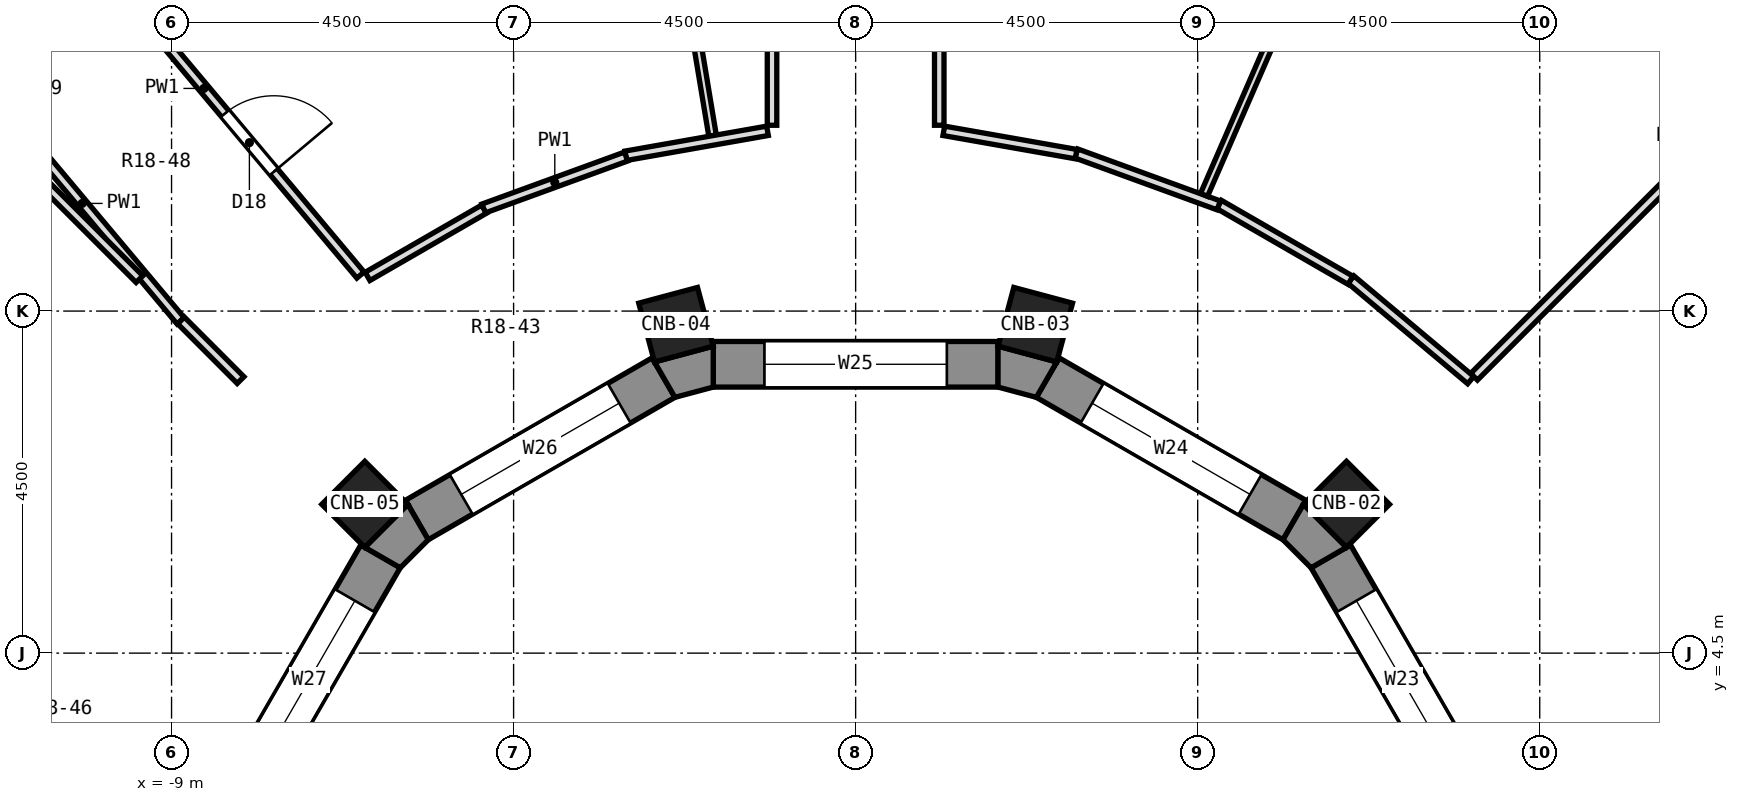
"""IFC4 building model, lengths in metres.
Left out: names, types, materials, properties, quantities, classifications, styles, units other than length and angle.
Written with IfcOpenShell. Run it as: python <this file> out.ifc"""

import sys

from ifc_helpers import new_model, si_unit, direction, frame, frame_2d, origin, origin_2d, place, context, subcontext, project, spatial, polyline, rectangle, outline, extrude, element, fill, save


model = new_model("IFC4")
c1 = context("Model", 3, precision=1e-05, world=origin(), true_north=direction((0.0, 1.0)))
c2 = subcontext(c1, "Body", "Model", "MODEL_VIEW")
j1 = project(units=[si_unit("LENGTHUNIT", "METRE"), si_unit("PLANEANGLEUNIT", "RADIAN")], contexts=[c1])
p1 = place(None, origin())
s1 = spatial("IfcSite", under=j1, at=p1, CompositionType="ELEMENT")
p2 = place(p1, origin())
s2 = spatial("IfcBuilding", under=s1, at=p2, CompositionType="ELEMENT")
p3 = place(p2, frame((0.0, 0.0, 101.8)))
s3 = spatial("IfcBuildingStorey", under=s2, at=p3, CompositionType="ELEMENT", Elevation=101.8)
for number, where, z_axis, x_axis in (
    (1, (6.458, 6.458, 0.0), (0.0, 0.0, 1.0), (0.707, 0.707, 0.0)),
    (2, (2.364, 8.821, 0.0), (0.0, 0.0, 1.0), (0.259, 0.966, 0.0)),
    (3, (-2.364, 8.821, 0.0), (0.0, 0.0, 1.0), (-0.259, 0.966, 0.0)),
    (4, (-6.458, 6.458, 0.0), (0.0, 0.0, 1.0), (-0.707, 0.707, 0.0)),
):
    element("IfcColumn", number, at=place(p3, frame(where, z_axis=z_axis, x_axis=x_axis)), inside=s3, PredefinedType="COLUMN", context=c2, shape_type="SweptSolid", body=[
        extrude(rectangle(XDim=0.8, YDim=0.8, at=origin_2d()), origin(), (0.0, 0.0, 1.0), 3.3),
    ])
p4 = place(p3, frame((8.125, 2.527, 0.0), z_axis=(0.0, 0.0, 1.0), x_axis=(-0.499964958637, 0.86604563398, 0.0)))
e5 = element("IfcWall", 5, at=p4, inside=s3, PredefinedType="SOLIDWALL", context=c2, shape_type="SweptSolid", body=[
    extrude(rectangle(XDim=3.747, YDim=0.6, at=frame_2d((1.874, 0.0))), origin(), (0.0, 0.0, 1.0), 2.8),
])
p5 = place(p4, frame((0.674, 0.0, 0.9)))
e6 = element("IfcOpeningElement", 6, at=p5, cuts=e5, PredefinedType="OPENING", context=c2, shape_type="SweptSolid", body=[
    extrude(rectangle(XDim=2.4, YDim=1.8, at=frame_2d((1.2, 0.9))), frame((0.0, 0.312, 0.0), z_axis=(0.0, -1.0, 0.0), x_axis=(1.0, 0.0, 0.0)), (0.0, 0.0, 1.0), 0.624),
])
p6 = place(p3, frame((5.773, 6.251, 0.0), z_axis=(0.0, 0.0, 1.0), x_axis=(-0.86604563398, 0.499964958637, 0.0)))
e7 = element("IfcWall", 7, at=p6, inside=s3, PredefinedType="SOLIDWALL", context=c2, shape_type="SweptSolid", body=[
    extrude(rectangle(XDim=3.747, YDim=0.6, at=frame_2d((1.874, 0.0))), origin(), (0.0, 0.0, 1.0), 2.8),
])
p7 = place(p6, frame((0.674, 0.0, 0.9)))
e8 = element("IfcOpeningElement", 8, at=p7, cuts=e7, PredefinedType="OPENING", context=c2, shape_type="SweptSolid", body=[
    extrude(rectangle(XDim=2.4, YDim=1.8, at=frame_2d((1.2, 0.9))), frame((0.0, 0.312, 0.0), z_axis=(0.0, -1.0, 0.0), x_axis=(1.0, 0.0, 0.0)), (0.0, 0.0, 1.0), 0.624),
])
p8 = place(p3, frame((1.874, 8.3, 0.0), z_axis=(0.0, 0.0, 1.0), x_axis=(-1.0, 0.0, 0.0)))
e9 = element("IfcWall", 9, at=p8, inside=s3, PredefinedType="SOLIDWALL", context=c2, shape_type="SweptSolid", body=[
    extrude(rectangle(XDim=3.748, YDim=0.6, at=frame_2d((1.874, 0.0))), origin(), (0.0, 0.0, 1.0), 2.8),
])
p9 = place(p8, frame((0.674, 0.0, 0.9)))
e10 = element("IfcOpeningElement", 10, at=p9, cuts=e9, PredefinedType="OPENING", context=c2, shape_type="SweptSolid", body=[
    extrude(rectangle(XDim=2.4, YDim=1.8, at=frame_2d((1.2, 0.9))), frame((0.0, 0.312, 0.0), z_axis=(0.0, -1.0, 0.0), x_axis=(1.0, 0.0, 0.0)), (0.0, 0.0, 1.0), 0.624),
])
p10 = place(p3, frame((-2.527, 8.125, 0.0), z_axis=(0.0, 0.0, 1.0), x_axis=(-0.86604563398, -0.499964958637, 0.0)))
e11 = element("IfcWall", 11, at=p10, inside=s3, PredefinedType="SOLIDWALL", context=c2, shape_type="SweptSolid", body=[
    extrude(rectangle(XDim=3.747, YDim=0.6, at=frame_2d((1.874, 0.0))), origin(), (0.0, 0.0, 1.0), 2.8),
])
p11 = place(p10, frame((0.674, 0.0, 0.9)))
e12 = element("IfcOpeningElement", 12, at=p11, cuts=e11, PredefinedType="OPENING", context=c2, shape_type="SweptSolid", body=[
    extrude(rectangle(XDim=2.4, YDim=1.8, at=frame_2d((1.2, 0.9))), frame((0.0, 0.312, 0.0), z_axis=(0.0, -1.0, 0.0), x_axis=(1.0, 0.0, 0.0)), (0.0, 0.0, 1.0), 0.624),
])
p12 = place(p3, frame((-6.251, 5.773, 0.0), z_axis=(0.0, 0.0, 1.0), x_axis=(-0.499964958637, -0.86604563398, 0.0)))
e13 = element("IfcWall", 13, at=p12, inside=s3, PredefinedType="SOLIDWALL", context=c2, shape_type="SweptSolid", body=[
    extrude(rectangle(XDim=3.747, YDim=0.6, at=frame_2d((1.874, 0.0))), origin(), (0.0, 0.0, 1.0), 2.8),
])
p13 = place(p12, frame((0.674, 0.0, 0.9)))
e14 = element("IfcOpeningElement", 14, at=p13, cuts=e13, PredefinedType="OPENING", context=c2, shape_type="SweptSolid", body=[
    extrude(rectangle(XDim=2.4, YDim=1.8, at=frame_2d((1.2, 0.9))), frame((0.0, 0.312, 0.0), z_axis=(0.0, -1.0, 0.0), x_axis=(1.0, 0.0, 0.0)), (0.0, 0.0, 1.0), 0.624),
])
p14 = place(p3, origin())
e15 = element("IfcWall", 15, at=p14, inside=s3, PredefinedType="SOLIDWALL", context=c2, shape_type="SweptSolid", body=[
    extrude(outline(polyline([(5.892, 6.458), (5.623, 5.991), (5.991, 5.623), (6.458, 5.892), (5.892, 6.458)])), origin(), (0.0, 0.0, 1.0), 2.8),
])
p15 = place(p3, origin())
e16 = element("IfcWall", 16, at=p15, inside=s3, PredefinedType="SOLIDWALL", context=c2, shape_type="SweptSolid", body=[
    extrude(outline(polyline([(1.874, 8.538), (1.874, 8.0), (2.377, 7.865), (2.646, 8.331), (1.874, 8.538)])), origin(), (0.0, 0.0, 1.0), 2.8),
])
p16 = place(p3, origin())
e17 = element("IfcWall", 17, at=p16, inside=s3, PredefinedType="SOLIDWALL", context=c2, shape_type="SweptSolid", body=[
    extrude(outline(polyline([(-2.646, 8.331), (-2.377, 7.865), (-1.874, 8.0), (-1.874, 8.538), (-2.646, 8.331)])), origin(), (0.0, 0.0, 1.0), 2.8),
])
p17 = place(p3, origin())
e18 = element("IfcWall", 18, at=p17, inside=s3, PredefinedType="SOLIDWALL", context=c2, shape_type="SweptSolid", body=[
    extrude(outline(polyline([(-6.458, 5.892), (-5.991, 5.623), (-5.623, 5.991), (-5.892, 6.458), (-6.458, 5.892)])), origin(), (0.0, 0.0, 1.0), 2.8),
])
p18 = place(p3, frame((-2.655, 15.951, 0.0), z_axis=(0.0, 0.0, 1.0), x_axis=(0.164012054584, -0.986458334625, 0.0)))
e19 = element("IfcWall", 19, at=p18, inside=s3, PredefinedType="PARTITIONING", context=c2, shape_type="SweptSolid", body=[
    extrude(rectangle(XDim=4.707, YDim=0.1, at=frame_2d((2.354, 0.0))), origin(), (0.0, 0.0, 1.0), 2.8),
])
p19 = place(p18, frame((0.61, 0.0, 0.0)))
e20 = element("IfcOpeningElement", 20, at=p19, cuts=e19, PredefinedType="OPENING", context=c2, shape_type="SweptSolid", body=[
    extrude(rectangle(XDim=0.9, YDim=2.1, at=frame_2d((0.45, 1.05))), frame((0.0, 0.062, 0.0), z_axis=(0.0, -1.0, 0.0), x_axis=(1.0, 0.0, 0.0)), (0.0, 0.0, 1.0), 0.124),
])
p20 = place(p3, frame((-11.472, 11.962, 0.0), z_axis=(0.0, 0.0, 1.0), x_axis=(0.642533165624, -0.766257875048, 0.0)))
e21 = element("IfcWall", 21, at=p20, inside=s3, PredefinedType="PARTITIONING", context=c2, shape_type="SweptSolid", body=[
    extrude(rectangle(XDim=4.033, YDim=0.125, at=frame_2d((2.017, 0.0))), origin(), (0.0, 0.0, 1.0), 2.8),
])
p21 = place(p3, frame((-9.828, 13.423, 0.0), z_axis=(0.0, 0.0, 1.0), x_axis=(0.642779949684, -0.766050870559, 0.0)))
e22 = element("IfcWall", 22, at=p21, inside=s3, PredefinedType="PARTITIONING", context=c2, shape_type="SweptSolid", body=[
    extrude(rectangle(XDim=5.155, YDim=0.125, at=frame_2d((2.578, 0.0))), origin(), (0.0, 0.0, 1.0), 2.8),
])
p22 = place(p21, frame((2.381, 0.0, 0.0)))
e23 = element("IfcOpeningElement", 23, at=p22, cuts=e22, PredefinedType="OPENING", context=c2, shape_type="SweptSolid", body=[
    extrude(rectangle(XDim=1.0, YDim=2.1, at=frame_2d((0.5, 1.05))), frame((0.0, 0.074, 0.0), z_axis=(0.0, -1.0, 0.0), x_axis=(1.0, 0.0, 0.0)), (0.0, 0.0, 1.0), 0.149),
])
p23 = place(p3, frame((-8.875, 8.876, 0.0), z_axis=(0.0, 0.0, 1.0), x_axis=(0.706666079052, -0.707547208826, 0.0)))
e24 = element("IfcWall", 24, at=p23, inside=s3, PredefinedType="PARTITIONING", context=c2, shape_type="SweptSolid", body=[
    extrude(rectangle(XDim=1.108, YDim=0.125, at=frame_2d((0.554, 0.0))), origin(), (0.0, 0.0, 1.0), 2.8),
])
p24 = place(p3, frame((-13.101, 13.099, 0.0), z_axis=(0.0, 0.0, 1.0), x_axis=(0.707106781187, -0.707106781187, 0.0)))
e25 = element("IfcWall", 25, at=p24, inside=s3, PredefinedType="PARTITIONING", context=c2, shape_type="SweptSolid", body=[
    extrude(rectangle(XDim=5.203, YDim=0.125, at=frame_2d((2.602, 0.0))), origin(), (0.0, 0.0, 1.0), 2.8),
])
p25 = place(p3, frame((6.515, 9.415, 0.0), z_axis=(0.0, 0.0, 1.0), x_axis=(0.766097328455, -0.642724578131, 0.0)))
e26 = element("IfcWall", 26, at=p25, inside=s3, PredefinedType="PARTITIONING", context=c2, shape_type="SweptSolid", body=[
    extrude(rectangle(XDim=2.058, YDim=0.125, at=frame_2d((1.029, 0.0))), origin(), (0.0, 0.0, 1.0), 2.8),
])
p26 = place(p3, frame((4.781, 10.403, 0.0), z_axis=(0.0, 0.0, 1.0), x_axis=(0.866173368732, -0.499743629573, 0.0)))
e27 = element("IfcWall", 27, at=p26, inside=s3, PredefinedType="PARTITIONING", context=c2, shape_type="SweptSolid", body=[
    extrude(rectangle(XDim=1.996, YDim=0.125, at=frame_2d((0.998, 0.0))), origin(), (0.0, 0.0, 1.0), 2.8),
])
p27 = place(p3, frame((2.902, 11.073, 0.0), z_axis=(0.0, 0.0, 1.0), x_axis=(0.939557391744, -0.342391453777, 0.0)))
e28 = element("IfcWall", 28, at=p27, inside=s3, PredefinedType="PARTITIONING", context=c2, shape_type="SweptSolid", body=[
    extrude(rectangle(XDim=1.995, YDim=0.125, at=frame_2d((0.998, 0.0))), origin(), (0.0, 0.0, 1.0), 2.8),
])
p28 = place(p3, frame((1.16, 11.371, 0.0), z_axis=(0.0, 0.0, 1.0), x_axis=(0.984859944288, -0.173351925678, 0.0)))
e29 = element("IfcWall", 29, at=p28, inside=s3, PredefinedType="PARTITIONING", context=c2, shape_type="SweptSolid", body=[
    extrude(rectangle(XDim=1.768, YDim=0.125, at=frame_2d((0.884, 0.0))), origin(), (0.0, 0.0, 1.0), 2.8),
])
p29 = place(p3, frame((-3.024, 11.043, 0.0), z_axis=(0.0, 0.0, 1.0), x_axis=(0.984843218933, 0.173446920187, 0.0)))
e30 = element("IfcWall", 30, at=p29, inside=s3, PredefinedType="PARTITIONING", context=c2, shape_type="SweptSolid", body=[
    extrude(rectangle(XDim=1.893, YDim=0.125, at=frame_2d((0.947, 0.0))), origin(), (0.0, 0.0, 1.0), 2.8),
])
p30 = place(p3, frame((-4.896, 10.349, 0.0), z_axis=(0.0, 0.0, 1.0), x_axis=(0.939546719529, 0.342420738016, 0.0)))
e31 = element("IfcWall", 31, at=p30, inside=s3, PredefinedType="PARTITIONING", context=c2, shape_type="SweptSolid", body=[
    extrude(rectangle(XDim=1.996, YDim=0.125, at=frame_2d((0.998, 0.0))), origin(), (0.0, 0.0, 1.0), 2.8),
])
p31 = place(p3, frame((-6.421, 9.456, 0.0), z_axis=(0.0, 0.0, 1.0), x_axis=(0.866153397047, 0.499778243608, 0.0)))
e32 = element("IfcWall", 32, at=p31, inside=s3, PredefinedType="PARTITIONING", context=c2, shape_type="SweptSolid", body=[
    extrude(rectangle(XDim=1.768, YDim=0.125, at=frame_2d((0.884, 0.0))), origin(), (0.0, 0.0, 1.0), 2.8),
])
p32 = place(p3, frame((-11.736, 11.822, 0.0), z_axis=(0.0, 0.0, 1.0), x_axis=(0.765966295507, 0.642880730888, 0.0)))
e33 = element("IfcWall", 33, at=p32, inside=s3, PredefinedType="PARTITIONING", context=c2, shape_type="SweptSolid", body=[
    extrude(rectangle(XDim=2.428, YDim=0.125, at=frame_2d((1.214, 0.0))), origin(), (0.0, 0.0, 1.0), 2.8),
])
p33 = place(p32, frame((0.941, 0.0, 0.0)))
e34 = element("IfcOpeningElement", 34, at=p33, cuts=e33, PredefinedType="OPENING", context=c2, shape_type="SweptSolid", body=[
    extrude(rectangle(XDim=0.9, YDim=2.1, at=frame_2d((0.45, 1.05))), frame((0.0, 0.074, 0.0), z_axis=(0.0, -1.0, 0.0), x_axis=(1.0, 0.0, 0.0)), (0.0, 0.0, 1.0), 0.149),
])
p34 = place(p3, frame((8.136, 8.136, 0.0), z_axis=(0.0, 0.0, 1.0), x_axis=(0.707106781187, 0.707106781187, 0.0)))
e35 = element("IfcWall", 35, at=p34, inside=s3, PredefinedType="PARTITIONING", context=c2, shape_type="SweptSolid", body=[
    extrude(rectangle(XDim=7.415, YDim=0.125, at=frame_2d((3.708, 0.0))), origin(), (0.0, 0.0, 1.0), 2.8),
])
p35 = place(p3, frame((4.584, 10.529, 0.0), z_axis=(0.0, 0.0, 1.0), x_axis=(0.39900110087, 0.916950446592, 0.0)))
e36 = element("IfcWall", 36, at=p35, inside=s3, PredefinedType="PARTITIONING", context=c2, shape_type="SweptSolid", body=[
    extrude(rectangle(XDim=7.401, YDim=0.1, at=frame_2d((3.701, 0.0))), origin(), (0.0, 0.0, 1.0), 2.8),
])
p36 = place(p35, frame((3.243, 0.0, 0.0)))
e37 = element("IfcOpeningElement", 37, at=p36, cuts=e36, PredefinedType="OPENING", context=c2, shape_type="SweptSolid", body=[
    extrude(rectangle(XDim=0.9, YDim=2.1, at=frame_2d((0.45, 1.05))), frame((0.0, 0.062, 0.0), z_axis=(0.0, -1.0, 0.0), x_axis=(1.0, 0.0, 0.0)), (0.0, 0.0, 1.0), 0.124),
])
for number, where, z_axis, x_axis in (
    (38, (1.1, 11.445, 0.0), (0.0, 0.0, 1.0), (0.0, 1.0, 0.0)),
    (39, (-1.1, 11.445, 0.0), (0.0, 0.0, 1.0), (0.0, 1.0, 0.0)),
):
    element("IfcWall", number, at=place(p3, frame(where, z_axis=z_axis, x_axis=x_axis)), inside=s3, PredefinedType="PARTITIONING", context=c2, shape_type="SweptSolid", body=[
        extrude(rectangle(XDim=5.092, YDim=0.125, at=frame_2d((2.546, 0.0))), origin(), (0.0, 0.0, 1.0), 2.8),
    ])
p37 = place(p5, origin())
e40 = element("IfcWindow", 40, at=p37, inside=s3, PartitioningType="SINGLE_PANEL", PredefinedType="WINDOW", context=c2, shape_type="SweptSolid", body=[
    extrude(rectangle(XDim=2.4, YDim=1.8, at=frame_2d((1.2, 0.9))), frame((0.0, -0.12, 0.0), z_axis=(0.0, -1.0, 0.0), x_axis=(1.0, 0.0, 0.0)), (0.0, 0.0, 1.0), 0.06),
])
fill(e6, e40)
p38 = place(p7, origin())
e41 = element("IfcWindow", 41, at=p38, inside=s3, PartitioningType="SINGLE_PANEL", PredefinedType="WINDOW", context=c2, shape_type="SweptSolid", body=[
    extrude(rectangle(XDim=2.4, YDim=1.8, at=frame_2d((1.2, 0.9))), frame((0.0, -0.12, 0.0), z_axis=(0.0, -1.0, 0.0), x_axis=(1.0, 0.0, 0.0)), (0.0, 0.0, 1.0), 0.06),
])
fill(e8, e41)
p39 = place(p9, origin())
e42 = element("IfcWindow", 42, at=p39, inside=s3, PartitioningType="SINGLE_PANEL", PredefinedType="WINDOW", context=c2, shape_type="SweptSolid", body=[
    extrude(rectangle(XDim=2.4, YDim=1.8, at=frame_2d((1.2, 0.9))), frame((0.0, -0.12, 0.0), z_axis=(0.0, -1.0, 0.0), x_axis=(1.0, 0.0, 0.0)), (0.0, 0.0, 1.0), 0.06),
])
fill(e10, e42)
p40 = place(p11, origin())
e43 = element("IfcWindow", 43, at=p40, inside=s3, PartitioningType="SINGLE_PANEL", PredefinedType="WINDOW", context=c2, shape_type="SweptSolid", body=[
    extrude(rectangle(XDim=2.4, YDim=1.8, at=frame_2d((1.2, 0.9))), frame((0.0, -0.12, 0.0), z_axis=(0.0, -1.0, 0.0), x_axis=(1.0, 0.0, 0.0)), (0.0, 0.0, 1.0), 0.06),
])
fill(e12, e43)
p41 = place(p13, origin())
e44 = element("IfcWindow", 44, at=p41, inside=s3, PartitioningType="SINGLE_PANEL", PredefinedType="WINDOW", context=c2, shape_type="SweptSolid", body=[
    extrude(rectangle(XDim=2.4, YDim=1.8, at=frame_2d((1.2, 0.9))), frame((0.0, -0.12, 0.0), z_axis=(0.0, -1.0, 0.0), x_axis=(1.0, 0.0, 0.0)), (0.0, 0.0, 1.0), 0.06),
])
fill(e14, e44)
p42 = place(p22, origin())
e45 = element("IfcDoor", 45, at=p42, inside=s3, OperationType="SINGLE_SWING_RIGHT", PredefinedType="DOOR", context=c2, shape_type="SweptSolid", body=[
    extrude(rectangle(XDim=1.0, YDim=2.1, at=frame_2d((0.5, 1.05))), frame((0.0, 0.025, 0.0), z_axis=(0.0, -1.0, 0.0), x_axis=(1.0, 0.0, 0.0)), (0.0, 0.0, 1.0), 0.05),
])
fill(e23, e45)
save(model, sys.argv[1])
